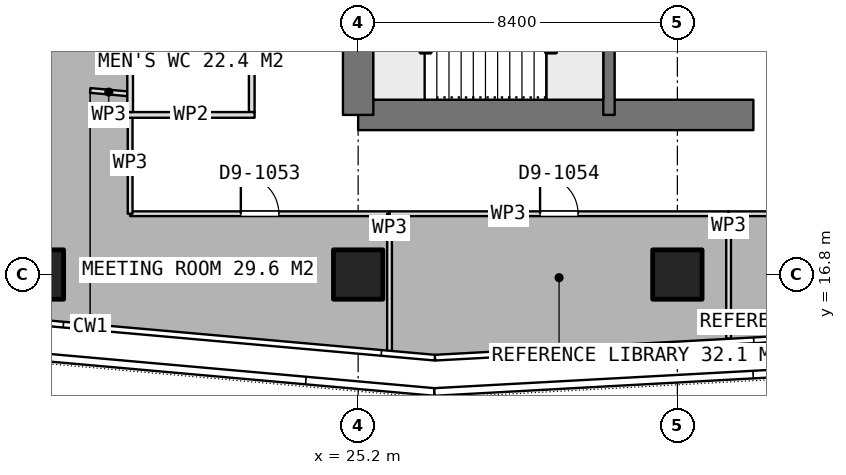
"""IFC4 building model, lengths in metres.
Left out: names, types, materials, properties, quantities, classifications, styles, units other than length and angle.
Written with IfcOpenShell. Run it as: python <this file> out.ifc"""

import sys

from ifc_helpers import new_model, si_unit, direction, frame, frame_2d, origin, origin_2d, place, context, subcontext, project, spatial, rectangle, extrude, element, fill, save


model = new_model("IFC4")
c1 = context("Model", 3, precision=1e-05, world=origin(), true_north=direction((0.0, 1.0)))
c2 = subcontext(c1, "Body", "Model", "MODEL_VIEW")
j1 = project(units=[si_unit("LENGTHUNIT", "METRE"), si_unit("PLANEANGLEUNIT", "RADIAN")], contexts=[c1])
p1 = place(None, origin())
s1 = spatial("IfcSite", under=j1, at=p1, CompositionType="ELEMENT")
p2 = place(p1, origin())
s2 = spatial("IfcBuilding", under=s1, at=p2, CompositionType="ELEMENT")
p3 = place(p2, frame((0.0, 0.0, 287.6)))
s3 = spatial("IfcBuildingStorey", under=s2, at=p3, CompositionType="ELEMENT", Elevation=287.6)
p4 = place(p3, frame((25.2, 21.0, 0.0), z_axis=(0.0, 0.0, 1.0), x_axis=(1.0, 0.0, 0.0)))
e1 = element("IfcWall", 1, at=p4, inside=s3, PredefinedType="SHEAR", context=c2, shape_type="SweptSolid", body=[
    extrude(rectangle(XDim=10.4, YDim=0.8, at=frame_2d((5.2, 0.0))), origin(), (0.0, 0.0, 1.0), 3.75),
])
p5 = place(p3, frame((25.2, 21.0, 0.0), z_axis=(0.0, 0.0, 1.0), x_axis=(0.0, 1.0, 0.0)))
e2 = element("IfcWall", 2, at=p5, inside=s3, PredefinedType="SHEAR", context=c2, shape_type="SweptSolid", body=[
    extrude(rectangle(XDim=25.2, YDim=0.8, at=frame_2d((12.6, 0.0))), origin(), (0.0, 0.0, 1.0), 3.75),
])
p6 = place(p5, frame((7.8, 0.0, 0.0)))
e3 = element("IfcOpeningElement", 3, at=p6, cuts=e2, PredefinedType="OPENING", context=c2, shape_type="SweptSolid", body=[
    extrude(rectangle(XDim=1.2, YDim=2.1, at=frame_2d((0.6, 1.05))), frame((0.0, 0.41, 0.0), z_axis=(0.0, -1.0, 0.0), x_axis=(1.0, 0.0, 0.0)), (0.0, 0.0, 1.0), 0.82),
])
p7 = place(p5, frame((14.25, 0.0, 0.0)))
e4 = element("IfcOpeningElement", 4, at=p7, cuts=e2, PredefinedType="OPENING", context=c2, shape_type="SweptSolid", body=[
    extrude(rectangle(XDim=0.9, YDim=2.1, at=frame_2d((0.45, 1.05))), frame((0.0, 0.41, 0.0), z_axis=(0.0, -1.0, 0.0), x_axis=(1.0, 0.0, 0.0)), (0.0, 0.0, 1.0), 0.82),
])
p8 = place(p5, frame((16.85, 0.0, 0.0)))
e5 = element("IfcOpeningElement", 5, at=p8, cuts=e2, PredefinedType="OPENING", context=c2, shape_type="SweptSolid", body=[
    extrude(rectangle(XDim=0.9, YDim=2.1, at=frame_2d((0.45, 1.05))), frame((0.0, 0.41, 0.0), z_axis=(0.0, -1.0, 0.0), x_axis=(1.0, 0.0, 0.0)), (0.0, 0.0, 1.0), 0.82),
])
p9 = place(p5, frame((18.95, 0.0, 0.0)))
e6 = element("IfcOpeningElement", 6, at=p9, cuts=e2, PredefinedType="OPENING", context=c2, shape_type="SweptSolid", body=[
    extrude(rectangle(XDim=1.2, YDim=2.1, at=frame_2d((0.6, 1.05))), frame((0.0, 0.41, 0.0), z_axis=(0.0, -1.0, 0.0), x_axis=(1.0, 0.0, 0.0)), (0.0, 0.0, 1.0), 0.82),
])
p10 = place(p3, frame((31.8, 21.0, 0.0), z_axis=(0.0, 0.0, 1.0), x_axis=(0.0, 1.0, 0.0)))
e7 = element("IfcWall", 7, at=p10, inside=s3, PredefinedType="SHEAR", context=c2, shape_type="SweptSolid", body=[
    extrude(rectangle(XDim=25.2, YDim=0.3, at=frame_2d((12.6, 0.0))), origin(), (0.0, 0.0, 1.0), 3.75),
])
for number, where, z_axis, x_axis in (
    (8, (16.8, 16.8, 0.0), (0.0, 0.0, 1.0), (1.0, 0.0, 0.0)),
    (9, (25.2, 16.8, 0.0), (0.0, 0.0, 1.0), (1.0, 0.0, 0.0)),
    (10, (33.6, 16.8, 0.0), (0.0, 0.0, 1.0), (1.0, 0.0, 0.0)),
):
    element("IfcColumn", number, at=place(p3, frame(where, z_axis=z_axis, x_axis=x_axis)), inside=s3, PredefinedType="COLUMN", context=c2, shape_type="SweptSolid", body=[
        extrude(rectangle(XDim=1.3, YDim=1.3, at=origin_2d()), origin(), (0.0, 0.0, 1.0), 3.75),
    ])
p11 = place(p3, frame((19.125, 21.0, 0.0), z_axis=(0.0, 0.0, 1.0), x_axis=(1.0, 0.0, 0.0)))
e11 = element("IfcWall", 11, at=p11, inside=s3, PredefinedType="PARTITIONING", context=c2, shape_type="SweptSolid", body=[
    extrude(rectangle(XDim=3.35, YDim=0.15, at=frame_2d((1.675, 0.0))), origin(), (0.0, 0.0, 1.0), 3.45),
])
p12 = place(p3, frame((19.2, 21.075, 0.0), z_axis=(0.0, 0.0, 1.0), x_axis=(0.0, 1.0, 0.0)))
e12 = element("IfcWall", 12, at=p12, inside=s3, PredefinedType="PARTITIONING", context=c2, shape_type="SweptSolid", body=[
    extrude(rectangle(XDim=6.85, YDim=0.15, at=frame_2d((3.425, 0.0))), origin(), (0.0, 0.0, 1.0), 3.45),
])
p13 = place(p3, frame((22.4, 21.075, 0.0), z_axis=(0.0, 0.0, 1.0), x_axis=(0.0, 1.0, 0.0)))
e13 = element("IfcWall", 13, at=p13, inside=s3, PredefinedType="PARTITIONING", context=c2, shape_type="SweptSolid", body=[
    extrude(rectangle(XDim=6.85, YDim=0.15, at=frame_2d((3.425, 0.0))), origin(), (0.0, 0.0, 1.0), 3.45),
])
p14 = place(p13, frame((2.925, 0.0, 0.0)))
e14 = element("IfcOpeningElement", 14, at=p14, cuts=e13, PredefinedType="OPENING", context=c2, shape_type="SweptSolid", body=[
    extrude(rectangle(XDim=1.0, YDim=2.1, at=frame_2d((0.5, 1.05))), frame((0.0, 0.085, 0.0), z_axis=(0.0, -1.0, 0.0), x_axis=(1.0, 0.0, 0.0)), (0.0, 0.0, 1.0), 0.17),
])
p15 = place(p3, frame((34.948, 15.114, 0.0), z_axis=(0.0, 0.0, 1.0), x_axis=(0.0, 1.0, 0.0)))
e15 = element("IfcWall", 15, at=p15, inside=s3, PredefinedType="PARTITIONING", context=c2, shape_type="SweptSolid", body=[
    extrude(rectangle(XDim=3.286, YDim=0.125, at=frame_2d((1.643, 0.0))), origin(), (0.0, 0.0, 1.0), 3.45),
])
p16 = place(p3, frame((34.948, 18.4, 0.0), z_axis=(0.0, 0.0, 1.0), x_axis=(1.0, 0.0, 0.0)))
e16 = element("IfcWall", 16, at=p16, inside=s3, PredefinedType="PARTITIONING", context=c2, shape_type="SweptSolid", body=[
    extrude(rectangle(XDim=7.725, YDim=0.125, at=frame_2d((3.863, 0.0))), origin(), (0.0, 0.0, 1.0), 3.45),
])
p17 = place(p16, frame((3.363, 0.0, 0.0)))
e17 = element("IfcOpeningElement", 17, at=p17, cuts=e16, PredefinedType="OPENING", context=c2, shape_type="SweptSolid", body=[
    extrude(rectangle(XDim=1.0, YDim=2.1, at=frame_2d((0.5, 1.05))), frame((0.0, 0.073, 0.0), z_axis=(0.0, -1.0, 0.0), x_axis=(1.0, 0.0, 0.0)), (0.0, 0.0, 1.0), 0.145),
])
p18 = place(p3, frame((19.125, 21.557, 0.0), z_axis=(0.0, 0.0, 1.0), x_axis=(-0.996029022323, 0.089029133943, 0.0)))
e18 = element("IfcWall", 18, at=p18, inside=s3, PredefinedType="PARTITIONING", context=c2, shape_type="SweptSolid", body=[
    extrude(rectangle(XDim=0.979, YDim=0.125, at=frame_2d((0.49, 0.0))), origin(), (0.0, 0.0, 1.0), 3.45),
])
p19 = place(p3, frame((19.2, 18.4, 0.0), z_axis=(0.0, 0.0, 1.0), x_axis=(1.0, 0.0, 0.0)))
e19 = element("IfcWall", 19, at=p19, inside=s3, PredefinedType="PARTITIONING", context=c2, shape_type="SweptSolid", body=[
    extrude(rectangle(XDim=6.826, YDim=0.125, at=frame_2d((3.413, 0.0))), origin(), (0.0, 0.0, 1.0), 3.45),
])
p20 = place(p19, frame((2.913, 0.0, 0.0)))
e20 = element("IfcOpeningElement", 20, at=p20, cuts=e19, PredefinedType="OPENING", context=c2, shape_type="SweptSolid", body=[
    extrude(rectangle(XDim=1.0, YDim=2.1, at=frame_2d((0.5, 1.05))), frame((0.0, 0.073, 0.0), z_axis=(0.0, -1.0, 0.0), x_axis=(1.0, 0.0, 0.0)), (0.0, 0.0, 1.0), 0.145),
])
p21 = place(p3, frame((26.026, 18.4, 0.0), z_axis=(0.0, 0.0, 1.0), x_axis=(0.0, -1.0, 0.0)))
e21 = element("IfcWall", 21, at=p21, inside=s3, PredefinedType="PARTITIONING", context=c2, shape_type="SweptSolid", body=[
    extrude(rectangle(XDim=3.631, YDim=0.125, at=frame_2d((1.815, 0.0))), origin(), (0.0, 0.0, 1.0), 3.45),
])
p22 = place(p3, frame((19.2, 21.075, 0.0), z_axis=(0.0, 0.0, 1.0), x_axis=(0.0, -1.0, 0.0)))
e22 = element("IfcWall", 22, at=p22, inside=s3, PredefinedType="PARTITIONING", context=c2, shape_type="SweptSolid", body=[
    extrude(rectangle(XDim=2.675, YDim=0.125, at=frame_2d((1.337, 0.0))), origin(), (0.0, 0.0, 1.0), 3.45),
])
p23 = place(p3, frame((26.027, 18.4, 0.0), z_axis=(0.0, 0.0, 1.0), x_axis=(1.0, 0.0, 0.0)))
e23 = element("IfcWall", 23, at=p23, inside=s3, PredefinedType="PARTITIONING", context=c2, shape_type="SweptSolid", body=[
    extrude(rectangle(XDim=8.92, YDim=0.125, at=frame_2d((4.46, 0.0))), origin(), (0.0, 0.0, 1.0), 3.45),
])
p24 = place(p23, frame((3.96, 0.0, 0.0)))
e24 = element("IfcOpeningElement", 24, at=p24, cuts=e23, PredefinedType="OPENING", context=c2, shape_type="SweptSolid", body=[
    extrude(rectangle(XDim=1.0, YDim=2.1, at=frame_2d((0.5, 1.05))), frame((0.0, 0.073, 0.0), z_axis=(0.0, -1.0, 0.0), x_axis=(1.0, 0.0, 0.0)), (0.0, 0.0, 1.0), 0.145),
])
p25 = place(p20, origin())
e25 = element("IfcDoor", 25, at=p25, inside=s3, OperationType="SINGLE_SWING_LEFT", PredefinedType="DOOR", context=c2, shape_type="SweptSolid", body=[
    extrude(rectangle(XDim=1.0, YDim=2.1, at=frame_2d((0.5, 1.05))), frame((0.0, 0.025, 0.0), z_axis=(0.0, -1.0, 0.0), x_axis=(1.0, 0.0, 0.0)), (0.0, 0.0, 1.0), 0.05),
])
fill(e20, e25)
p26 = place(p24, origin())
e26 = element("IfcDoor", 26, at=p26, inside=s3, OperationType="SINGLE_SWING_LEFT", PredefinedType="DOOR", context=c2, shape_type="SweptSolid", body=[
    extrude(rectangle(XDim=1.0, YDim=2.1, at=frame_2d((0.5, 1.05))), frame((0.0, 0.025, 0.0), z_axis=(0.0, -1.0, 0.0), x_axis=(1.0, 0.0, 0.0)), (0.0, 0.0, 1.0), 0.05),
])
fill(e24, e26)
save(model, sys.argv[1])
